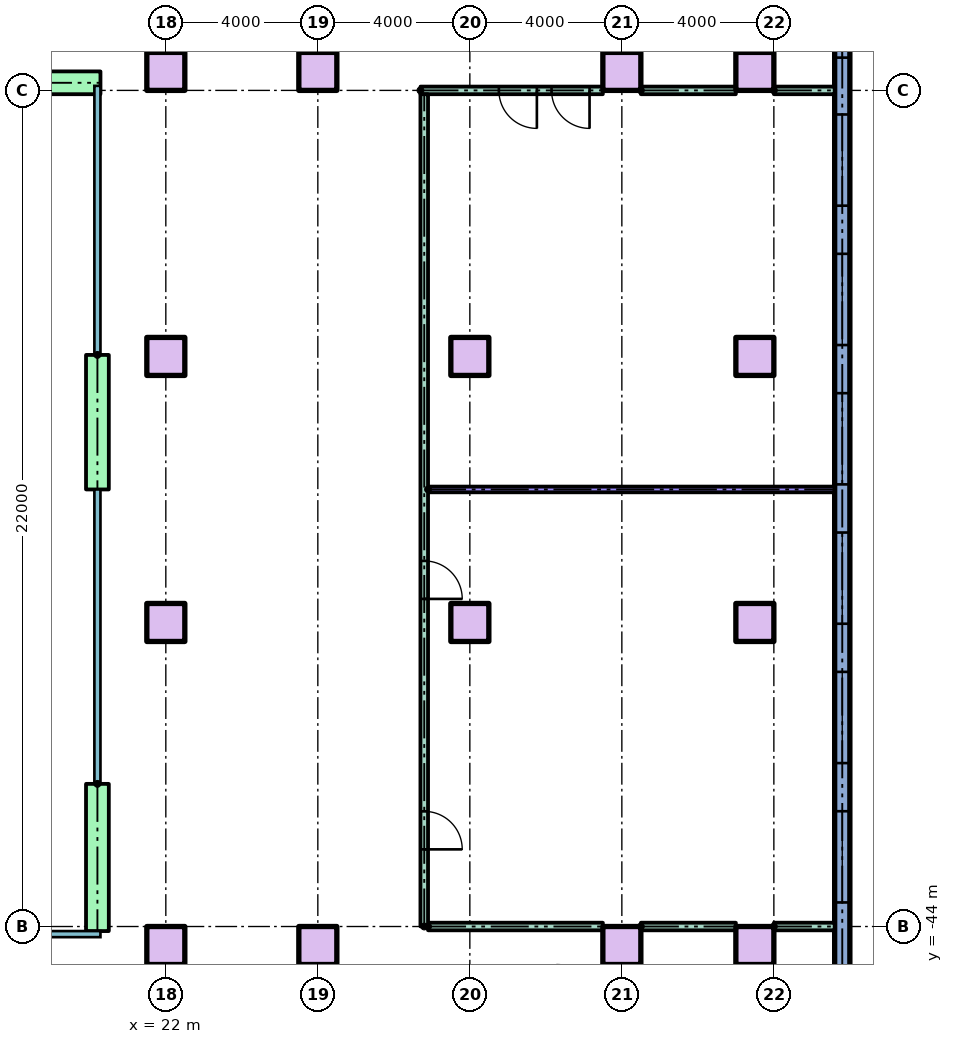
"""IFC4 building model, lengths in metres.
Left out: names, types, materials, properties, quantities, classifications, styles, units other than length and angle.
Written with IfcOpenShell. Run it as: python <this file> out.ifc"""

import sys

from ifc_helpers import new_model, si_unit, direction, frame, frame_2d, origin, origin_2d, place, context, subcontext, project, spatial, rectangle, extrude, element, fill, save


model = new_model("IFC4")
c1 = context("Model", 3, precision=1e-05, world=origin(), true_north=direction((0.0, 1.0)))
c2 = subcontext(c1, "Body", "Model", "MODEL_VIEW")
j1 = project(units=[si_unit("LENGTHUNIT", "METRE"), si_unit("PLANEANGLEUNIT", "RADIAN")], contexts=[c1])
p1 = place(None, origin())
s1 = spatial("IfcSite", under=j1, at=p1, CompositionType="ELEMENT")
p2 = place(p1, origin())
s2 = spatial("IfcBuilding", under=s1, at=p2, CompositionType="ELEMENT")
p3 = place(p2, frame((0.0, 0.0, 22.0)))
s3 = spatial("IfcBuildingStorey", under=s2, at=p3, CompositionType="ELEMENT", Elevation=22.0)
for number, where in (
    (1, (22.0, -44.5, 0.0)),
    (2, (26.0, -44.5, 0.0)),
    (3, (34.0, -44.5, 0.0)),
    (4, (37.5, -44.5, 0.0)),
    (5, (22.0, -36.0, 0.0)),
    (6, (30.0, -36.0, 0.0)),
    (7, (37.5, -36.0, 0.0)),
    (8, (22.0, -29.0, 0.0)),
    (9, (30.0, -29.0, 0.0)),
    (10, (37.5, -29.0, 0.0)),
    (11, (22.0, -21.5, 0.0)),
    (12, (26.0, -21.5, 0.0)),
    (13, (34.0, -21.5, 0.0)),
    (14, (37.5, -21.5, 0.0)),
):
    element("IfcColumn", number, at=place(p3, frame(where)), inside=s3, PredefinedType="COLUMN", context=c2, shape_type="SweptSolid", body=[
        extrude(rectangle(XDim=1.0, YDim=1.0, at=origin_2d()), origin(), (0.0, 0.0, 1.0), 3.7),
    ])
p4 = place(p3, frame((39.8, -50.0, 0.0), z_axis=(0.0, 0.0, 1.0), x_axis=(0.0, 1.0, 0.0)))
e15 = element("IfcWall", 15, at=p4, inside=s3, PredefinedType="STANDARD", context=c2, shape_type="SweptSolid", body=[
    extrude(rectangle(XDim=70.0, YDim=0.4, at=frame_2d((35.0, 0.0))), origin(), (0.0, 0.0, 1.0), 3.7),
])
p5 = place(p4, frame((0.75, 0.0, 0.9)))
e16 = element("IfcOpeningElement", 16, at=p5, cuts=e15, PredefinedType="OPENING", context=c2, shape_type="SweptSolid", body=[
    extrude(rectangle(XDim=2.4, YDim=2.1, at=frame_2d((1.2, 1.05))), frame((0.0, 0.21, 0.0), z_axis=(0.0, -1.0, 0.0), x_axis=(1.0, 0.0, 0.0)), (0.0, 0.0, 1.0), 0.42),
])
p6 = place(p4, frame((6.633, 0.0, 0.9)))
e17 = element("IfcOpeningElement", 17, at=p6, cuts=e15, PredefinedType="OPENING", context=c2, shape_type="SweptSolid", body=[
    extrude(rectangle(XDim=2.4, YDim=2.1, at=frame_2d((1.2, 1.05))), frame((0.0, 0.21, 0.0), z_axis=(0.0, -1.0, 0.0), x_axis=(1.0, 0.0, 0.0)), (0.0, 0.0, 1.0), 0.42),
])
p7 = place(p4, frame((10.3, 0.0, 0.9)))
e18 = element("IfcOpeningElement", 18, at=p7, cuts=e15, PredefinedType="OPENING", context=c2, shape_type="SweptSolid", body=[
    extrude(rectangle(XDim=2.4, YDim=2.1, at=frame_2d((1.2, 1.05))), frame((0.0, 0.21, 0.0), z_axis=(0.0, -1.0, 0.0), x_axis=(1.0, 0.0, 0.0)), (0.0, 0.0, 1.0), 0.42),
])
p8 = place(p4, frame((13.967, 0.0, 0.9)))
e19 = element("IfcOpeningElement", 19, at=p8, cuts=e15, PredefinedType="OPENING", context=c2, shape_type="SweptSolid", body=[
    extrude(rectangle(XDim=2.4, YDim=2.1, at=frame_2d((1.2, 1.05))), frame((0.0, 0.21, 0.0), z_axis=(0.0, -1.0, 0.0), x_axis=(1.0, 0.0, 0.0)), (0.0, 0.0, 1.0), 0.42),
])
p9 = place(p4, frame((17.633, 0.0, 0.9)))
e20 = element("IfcOpeningElement", 20, at=p9, cuts=e15, PredefinedType="OPENING", context=c2, shape_type="SweptSolid", body=[
    extrude(rectangle(XDim=2.4, YDim=2.1, at=frame_2d((1.2, 1.05))), frame((0.0, 0.21, 0.0), z_axis=(0.0, -1.0, 0.0), x_axis=(1.0, 0.0, 0.0)), (0.0, 0.0, 1.0), 0.42),
])
p10 = place(p4, frame((21.3, 0.0, 0.9)))
e21 = element("IfcOpeningElement", 21, at=p10, cuts=e15, PredefinedType="OPENING", context=c2, shape_type="SweptSolid", body=[
    extrude(rectangle(XDim=2.4, YDim=2.1, at=frame_2d((1.2, 1.05))), frame((0.0, 0.21, 0.0), z_axis=(0.0, -1.0, 0.0), x_axis=(1.0, 0.0, 0.0)), (0.0, 0.0, 1.0), 0.42),
])
p11 = place(p4, frame((24.967, 0.0, 0.9)))
e22 = element("IfcOpeningElement", 22, at=p11, cuts=e15, PredefinedType="OPENING", context=c2, shape_type="SweptSolid", body=[
    extrude(rectangle(XDim=2.4, YDim=2.1, at=frame_2d((1.2, 1.05))), frame((0.0, 0.21, 0.0), z_axis=(0.0, -1.0, 0.0), x_axis=(1.0, 0.0, 0.0)), (0.0, 0.0, 1.0), 0.42),
])
p12 = place(p4, frame((28.863, 0.0, 0.9)))
e23 = element("IfcOpeningElement", 23, at=p12, cuts=e15, PredefinedType="OPENING", context=c2, shape_type="SweptSolid", body=[
    extrude(rectangle(XDim=2.4, YDim=2.1, at=frame_2d((1.2, 1.05))), frame((0.0, 0.21, 0.0), z_axis=(0.0, -1.0, 0.0), x_axis=(1.0, 0.0, 0.0)), (0.0, 0.0, 1.0), 0.42),
])
p13 = place(p4, frame((32.988, 0.0, 0.9)))
e24 = element("IfcOpeningElement", 24, at=p13, cuts=e15, PredefinedType="OPENING", context=c2, shape_type="SweptSolid", body=[
    extrude(rectangle(XDim=2.4, YDim=2.1, at=frame_2d((1.2, 1.05))), frame((0.0, 0.21, 0.0), z_axis=(0.0, -1.0, 0.0), x_axis=(1.0, 0.0, 0.0)), (0.0, 0.0, 1.0), 0.42),
])
p14 = place(p4, frame((37.113, 0.0, 0.9)))
e25 = element("IfcOpeningElement", 25, at=p14, cuts=e15, PredefinedType="OPENING", context=c2, shape_type="SweptSolid", body=[
    extrude(rectangle(XDim=2.4, YDim=2.1, at=frame_2d((1.2, 1.05))), frame((0.0, 0.21, 0.0), z_axis=(0.0, -1.0, 0.0), x_axis=(1.0, 0.0, 0.0)), (0.0, 0.0, 1.0), 0.42),
])
p15 = place(p4, frame((41.238, 0.0, 0.9)))
e26 = element("IfcOpeningElement", 26, at=p15, cuts=e15, PredefinedType="OPENING", context=c2, shape_type="SweptSolid", body=[
    extrude(rectangle(XDim=2.4, YDim=2.1, at=frame_2d((1.2, 1.05))), frame((0.0, 0.21, 0.0), z_axis=(0.0, -1.0, 0.0), x_axis=(1.0, 0.0, 0.0)), (0.0, 0.0, 1.0), 0.42),
])
p16 = place(p4, frame((45.363, 0.0, 0.9)))
e27 = element("IfcOpeningElement", 27, at=p16, cuts=e15, PredefinedType="OPENING", context=c2, shape_type="SweptSolid", body=[
    extrude(rectangle(XDim=2.4, YDim=2.1, at=frame_2d((1.2, 1.05))), frame((0.0, 0.21, 0.0), z_axis=(0.0, -1.0, 0.0), x_axis=(1.0, 0.0, 0.0)), (0.0, 0.0, 1.0), 0.42),
])
p17 = place(p4, frame((49.488, 0.0, 0.9)))
e28 = element("IfcOpeningElement", 28, at=p17, cuts=e15, PredefinedType="OPENING", context=c2, shape_type="SweptSolid", body=[
    extrude(rectangle(XDim=2.4, YDim=2.1, at=frame_2d((1.2, 1.05))), frame((0.0, 0.21, 0.0), z_axis=(0.0, -1.0, 0.0), x_axis=(1.0, 0.0, 0.0)), (0.0, 0.0, 1.0), 0.42),
])
p18 = place(p4, frame((53.613, 0.0, 0.9)))
e29 = element("IfcOpeningElement", 29, at=p18, cuts=e15, PredefinedType="OPENING", context=c2, shape_type="SweptSolid", body=[
    extrude(rectangle(XDim=2.4, YDim=2.1, at=frame_2d((1.2, 1.05))), frame((0.0, 0.21, 0.0), z_axis=(0.0, -1.0, 0.0), x_axis=(1.0, 0.0, 0.0)), (0.0, 0.0, 1.0), 0.42),
])
p19 = place(p4, frame((57.738, 0.0, 0.9)))
e30 = element("IfcOpeningElement", 30, at=p19, cuts=e15, PredefinedType="OPENING", context=c2, shape_type="SweptSolid", body=[
    extrude(rectangle(XDim=2.4, YDim=2.1, at=frame_2d((1.2, 1.05))), frame((0.0, 0.21, 0.0), z_axis=(0.0, -1.0, 0.0), x_axis=(1.0, 0.0, 0.0)), (0.0, 0.0, 1.0), 0.42),
])
p20 = place(p4, frame((62.05, 0.0, 0.9)))
e31 = element("IfcOpeningElement", 31, at=p20, cuts=e15, PredefinedType="OPENING", context=c2, shape_type="SweptSolid", body=[
    extrude(rectangle(XDim=2.4, YDim=2.1, at=frame_2d((1.2, 1.05))), frame((0.0, 0.21, 0.0), z_axis=(0.0, -1.0, 0.0), x_axis=(1.0, 0.0, 0.0)), (0.0, 0.0, 1.0), 0.42),
])
p21 = place(p4, frame((66.55, 0.0, 0.9)))
e32 = element("IfcOpeningElement", 32, at=p21, cuts=e15, PredefinedType="OPENING", context=c2, shape_type="SweptSolid", body=[
    extrude(rectangle(XDim=2.4, YDim=2.1, at=frame_2d((1.2, 1.05))), frame((0.0, 0.21, 0.0), z_axis=(0.0, -1.0, 0.0), x_axis=(1.0, 0.0, 0.0)), (0.0, 0.0, 1.0), 0.42),
])
p22 = place(p3, frame((18.53, -21.8, 0.0)))
e33 = element("IfcWall", 33, at=p22, inside=s3, PredefinedType="STANDARD", context=c2, shape_type="SweptSolid", body=[
    extrude(rectangle(XDim=1.75, YDim=0.6, at=frame_2d((0.875, 0.0))), origin(), (0.0, 0.0, 1.0), 3.7),
])
p23 = place(p3, frame((20.2, -28.96, 0.0), z_axis=(0.0, 0.0, 1.0), x_axis=(0.0, -1.0, 0.0)))
e34 = element("IfcWall", 34, at=p23, inside=s3, PredefinedType="STANDARD", context=c2, shape_type="SweptSolid", body=[
    extrude(rectangle(XDim=3.54, YDim=0.6, at=frame_2d((1.77, 0.0))), origin(), (0.0, 0.0, 1.0), 3.7),
])
p24 = place(p3, frame((20.2, -40.247, 0.0), z_axis=(0.0, 0.0, 1.0), x_axis=(0.0, -1.0, 0.0)))
e35 = element("IfcWall", 35, at=p24, inside=s3, PredefinedType="STANDARD", context=c2, shape_type="SweptSolid", body=[
    extrude(rectangle(XDim=3.874, YDim=0.6, at=frame_2d((1.937, 0.0))), origin(), (0.0, 0.0, 1.0), 3.7),
])
p25 = place(p3, frame((28.9, -44.0, 0.0)))
e36 = element("IfcWall", 36, at=p25, inside=s3, PredefinedType="PARTITIONING", context=c2, shape_type="SweptSolid", body=[
    extrude(rectangle(XDim=4.6, YDim=0.2, at=frame_2d((2.3, 0.0))), origin(), (0.0, 0.0, 1.0), 3.2),
])
p26 = place(p3, frame((34.5, -44.0, 0.0)))
e37 = element("IfcWall", 37, at=p26, inside=s3, PredefinedType="PARTITIONING", context=c2, shape_type="SweptSolid", body=[
    extrude(rectangle(XDim=2.5, YDim=0.2, at=frame_2d((1.25, 0.0))), origin(), (0.0, 0.0, 1.0), 3.2),
])
p27 = place(p3, frame((38.0, -44.0, 0.0)))
e38 = element("IfcWall", 38, at=p27, inside=s3, PredefinedType="PARTITIONING", context=c2, shape_type="SweptSolid", body=[
    extrude(rectangle(XDim=1.6, YDim=0.2, at=frame_2d((0.8, 0.0))), origin(), (0.0, 0.0, 1.0), 3.2),
])
p28 = place(p3, frame((28.9, -32.5, 0.0)))
e39 = element("IfcWall", 39, at=p28, inside=s3, PredefinedType="PARTITIONING", context=c2, shape_type="SweptSolid", body=[
    extrude(rectangle(XDim=10.7, YDim=0.15, at=frame_2d((5.35, 0.0))), origin(), (0.0, 0.0, 1.0), 3.2),
])
p29 = place(p3, frame((28.7, -22.0, 0.0)))
e40 = element("IfcWall", 40, at=p29, inside=s3, PredefinedType="PARTITIONING", context=c2, shape_type="SweptSolid", body=[
    extrude(rectangle(XDim=4.8, YDim=0.2, at=frame_2d((2.4, 0.0))), origin(), (0.0, 0.0, 1.0), 3.2),
])
p30 = place(p29, frame((2.064, 0.0, 0.0)))
e41 = element("IfcOpeningElement", 41, at=p30, cuts=e40, PredefinedType="OPENING", context=c2, shape_type="SweptSolid", body=[
    extrude(rectangle(XDim=1.0, YDim=2.1, at=frame_2d((0.5, 1.05))), frame((0.0, 0.11, 0.0), z_axis=(0.0, -1.0, 0.0), x_axis=(1.0, 0.0, 0.0)), (0.0, 0.0, 1.0), 0.22),
])
p31 = place(p29, frame((3.45, 0.0, 0.0)))
e42 = element("IfcOpeningElement", 42, at=p31, cuts=e40, PredefinedType="OPENING", context=c2, shape_type="SweptSolid", body=[
    extrude(rectangle(XDim=1.0, YDim=2.1, at=frame_2d((0.5, 1.05))), frame((0.0, 0.11, 0.0), z_axis=(0.0, -1.0, 0.0), x_axis=(1.0, 0.0, 0.0)), (0.0, 0.0, 1.0), 0.22),
])
p32 = place(p3, frame((34.5, -22.0, 0.0)))
e43 = element("IfcWall", 43, at=p32, inside=s3, PredefinedType="PARTITIONING", context=c2, shape_type="SweptSolid", body=[
    extrude(rectangle(XDim=2.5, YDim=0.2, at=frame_2d((1.25, 0.0))), origin(), (0.0, 0.0, 1.0), 3.2),
])
p33 = place(p3, frame((38.0, -22.0, 0.0)))
e44 = element("IfcWall", 44, at=p33, inside=s3, PredefinedType="PARTITIONING", context=c2, shape_type="SweptSolid", body=[
    extrude(rectangle(XDim=1.6, YDim=0.2, at=frame_2d((0.8, 0.0))), origin(), (0.0, 0.0, 1.0), 3.2),
])
p34 = place(p3, frame((28.8, -44.0, 0.0), z_axis=(0.0, 0.0, 1.0), x_axis=(0.0, 1.0, 0.0)))
e45 = element("IfcWall", 45, at=p34, inside=s3, PredefinedType="PARTITIONING", context=c2, shape_type="SweptSolid", body=[
    extrude(rectangle(XDim=21.9, YDim=0.2, at=frame_2d((10.95, 0.0))), origin(), (0.0, 0.0, 1.0), 3.2),
])
p35 = place(p34, frame((2.03, 0.0, 0.0)))
e46 = element("IfcOpeningElement", 46, at=p35, cuts=e45, PredefinedType="OPENING", context=c2, shape_type="SweptSolid", body=[
    extrude(rectangle(XDim=1.0, YDim=2.1, at=frame_2d((0.5, 1.05))), frame((0.0, 0.11, 0.0), z_axis=(0.0, -1.0, 0.0), x_axis=(1.0, 0.0, 0.0)), (0.0, 0.0, 1.0), 0.22),
])
p36 = place(p34, frame((8.62, 0.0, 0.0)))
e47 = element("IfcOpeningElement", 47, at=p36, cuts=e45, PredefinedType="OPENING", context=c2, shape_type="SweptSolid", body=[
    extrude(rectangle(XDim=1.0, YDim=2.1, at=frame_2d((0.5, 1.05))), frame((0.0, 0.11, 0.0), z_axis=(0.0, -1.0, 0.0), x_axis=(1.0, 0.0, 0.0)), (0.0, 0.0, 1.0), 0.22),
])
p37 = place(p6, origin())
e48 = element("IfcWindow", 48, at=p37, inside=s3, PartitioningType="SINGLE_PANEL", PredefinedType="WINDOW", context=c2, shape_type="SweptSolid", body=[
    extrude(rectangle(XDim=2.4, YDim=2.1, at=frame_2d((1.2, 1.05))), frame((0.0, 0.03, 0.0), z_axis=(0.0, -1.0, 0.0), x_axis=(1.0, 0.0, 0.0)), (0.0, 0.0, 1.0), 0.06),
])
fill(e17, e48)
p38 = place(p7, origin())
e49 = element("IfcWindow", 49, at=p38, inside=s3, PartitioningType="SINGLE_PANEL", PredefinedType="WINDOW", context=c2, shape_type="SweptSolid", body=[
    extrude(rectangle(XDim=2.4, YDim=2.1, at=frame_2d((1.2, 1.05))), frame((0.0, 0.03, 0.0), z_axis=(0.0, -1.0, 0.0), x_axis=(1.0, 0.0, 0.0)), (0.0, 0.0, 1.0), 0.06),
])
fill(e18, e49)
p39 = place(p8, origin())
e50 = element("IfcWindow", 50, at=p39, inside=s3, PartitioningType="SINGLE_PANEL", PredefinedType="WINDOW", context=c2, shape_type="SweptSolid", body=[
    extrude(rectangle(XDim=2.4, YDim=2.1, at=frame_2d((1.2, 1.05))), frame((0.0, 0.03, 0.0), z_axis=(0.0, -1.0, 0.0), x_axis=(1.0, 0.0, 0.0)), (0.0, 0.0, 1.0), 0.06),
])
fill(e19, e50)
p40 = place(p9, origin())
e51 = element("IfcWindow", 51, at=p40, inside=s3, PartitioningType="SINGLE_PANEL", PredefinedType="WINDOW", context=c2, shape_type="SweptSolid", body=[
    extrude(rectangle(XDim=2.4, YDim=2.1, at=frame_2d((1.2, 1.05))), frame((0.0, 0.03, 0.0), z_axis=(0.0, -1.0, 0.0), x_axis=(1.0, 0.0, 0.0)), (0.0, 0.0, 1.0), 0.06),
])
fill(e20, e51)
p41 = place(p10, origin())
e52 = element("IfcWindow", 52, at=p41, inside=s3, PartitioningType="SINGLE_PANEL", PredefinedType="WINDOW", context=c2, shape_type="SweptSolid", body=[
    extrude(rectangle(XDim=2.4, YDim=2.1, at=frame_2d((1.2, 1.05))), frame((0.0, 0.03, 0.0), z_axis=(0.0, -1.0, 0.0), x_axis=(1.0, 0.0, 0.0)), (0.0, 0.0, 1.0), 0.06),
])
fill(e21, e52)
p42 = place(p11, origin())
e53 = element("IfcWindow", 53, at=p42, inside=s3, PartitioningType="SINGLE_PANEL", PredefinedType="WINDOW", context=c2, shape_type="SweptSolid", body=[
    extrude(rectangle(XDim=2.4, YDim=2.1, at=frame_2d((1.2, 1.05))), frame((0.0, 0.03, 0.0), z_axis=(0.0, -1.0, 0.0), x_axis=(1.0, 0.0, 0.0)), (0.0, 0.0, 1.0), 0.06),
])
fill(e22, e53)
p43 = place(p12, origin())
e54 = element("IfcWindow", 54, at=p43, inside=s3, PartitioningType="SINGLE_PANEL", PredefinedType="WINDOW", context=c2, shape_type="SweptSolid", body=[
    extrude(rectangle(XDim=2.4, YDim=2.1, at=frame_2d((1.2, 1.05))), frame((0.0, 0.03, 0.0), z_axis=(0.0, -1.0, 0.0), x_axis=(1.0, 0.0, 0.0)), (0.0, 0.0, 1.0), 0.06),
])
fill(e23, e54)
p44 = place(p35, frame((1.0, 0.0, 0.0), z_axis=(0.0, 0.0, 1.0), x_axis=(-1.0, 0.0, 0.0)))
e55 = element("IfcDoor", 55, at=p44, inside=s3, OperationType="SINGLE_SWING_LEFT", PredefinedType="DOOR", context=c2, shape_type="SweptSolid", body=[
    extrude(rectangle(XDim=1.0, YDim=2.1, at=frame_2d((0.5, 1.05))), frame((0.0, 0.025, 0.0), z_axis=(0.0, -1.0, 0.0), x_axis=(1.0, 0.0, 0.0)), (0.0, 0.0, 1.0), 0.05),
])
fill(e46, e55)
p45 = place(p36, frame((1.0, 0.0, 0.0), z_axis=(0.0, 0.0, 1.0), x_axis=(-1.0, 0.0, 0.0)))
e56 = element("IfcDoor", 56, at=p45, inside=s3, OperationType="SINGLE_SWING_LEFT", PredefinedType="DOOR", context=c2, shape_type="SweptSolid", body=[
    extrude(rectangle(XDim=1.0, YDim=2.1, at=frame_2d((0.5, 1.05))), frame((0.0, 0.025, 0.0), z_axis=(0.0, -1.0, 0.0), x_axis=(1.0, 0.0, 0.0)), (0.0, 0.0, 1.0), 0.05),
])
fill(e47, e56)
p46 = place(p30, frame((1.0, 0.0, 0.0), z_axis=(0.0, 0.0, 1.0), x_axis=(-1.0, 0.0, 0.0)))
e57 = element("IfcDoor", 57, at=p46, inside=s3, OperationType="SINGLE_SWING_RIGHT", PredefinedType="DOOR", context=c2, shape_type="SweptSolid", body=[
    extrude(rectangle(XDim=1.0, YDim=2.1, at=frame_2d((0.5, 1.05))), frame((0.0, 0.025, 0.0), z_axis=(0.0, -1.0, 0.0), x_axis=(1.0, 0.0, 0.0)), (0.0, 0.0, 1.0), 0.05),
])
fill(e41, e57)
p47 = place(p31, frame((1.0, 0.0, 0.0), z_axis=(0.0, 0.0, 1.0), x_axis=(-1.0, 0.0, 0.0)))
e58 = element("IfcDoor", 58, at=p47, inside=s3, OperationType="SINGLE_SWING_RIGHT", PredefinedType="DOOR", context=c2, shape_type="SweptSolid", body=[
    extrude(rectangle(XDim=1.0, YDim=2.1, at=frame_2d((0.5, 1.05))), frame((0.0, 0.025, 0.0), z_axis=(0.0, -1.0, 0.0), x_axis=(1.0, 0.0, 0.0)), (0.0, 0.0, 1.0), 0.05),
])
fill(e42, e58)
save(model, sys.argv[1])
